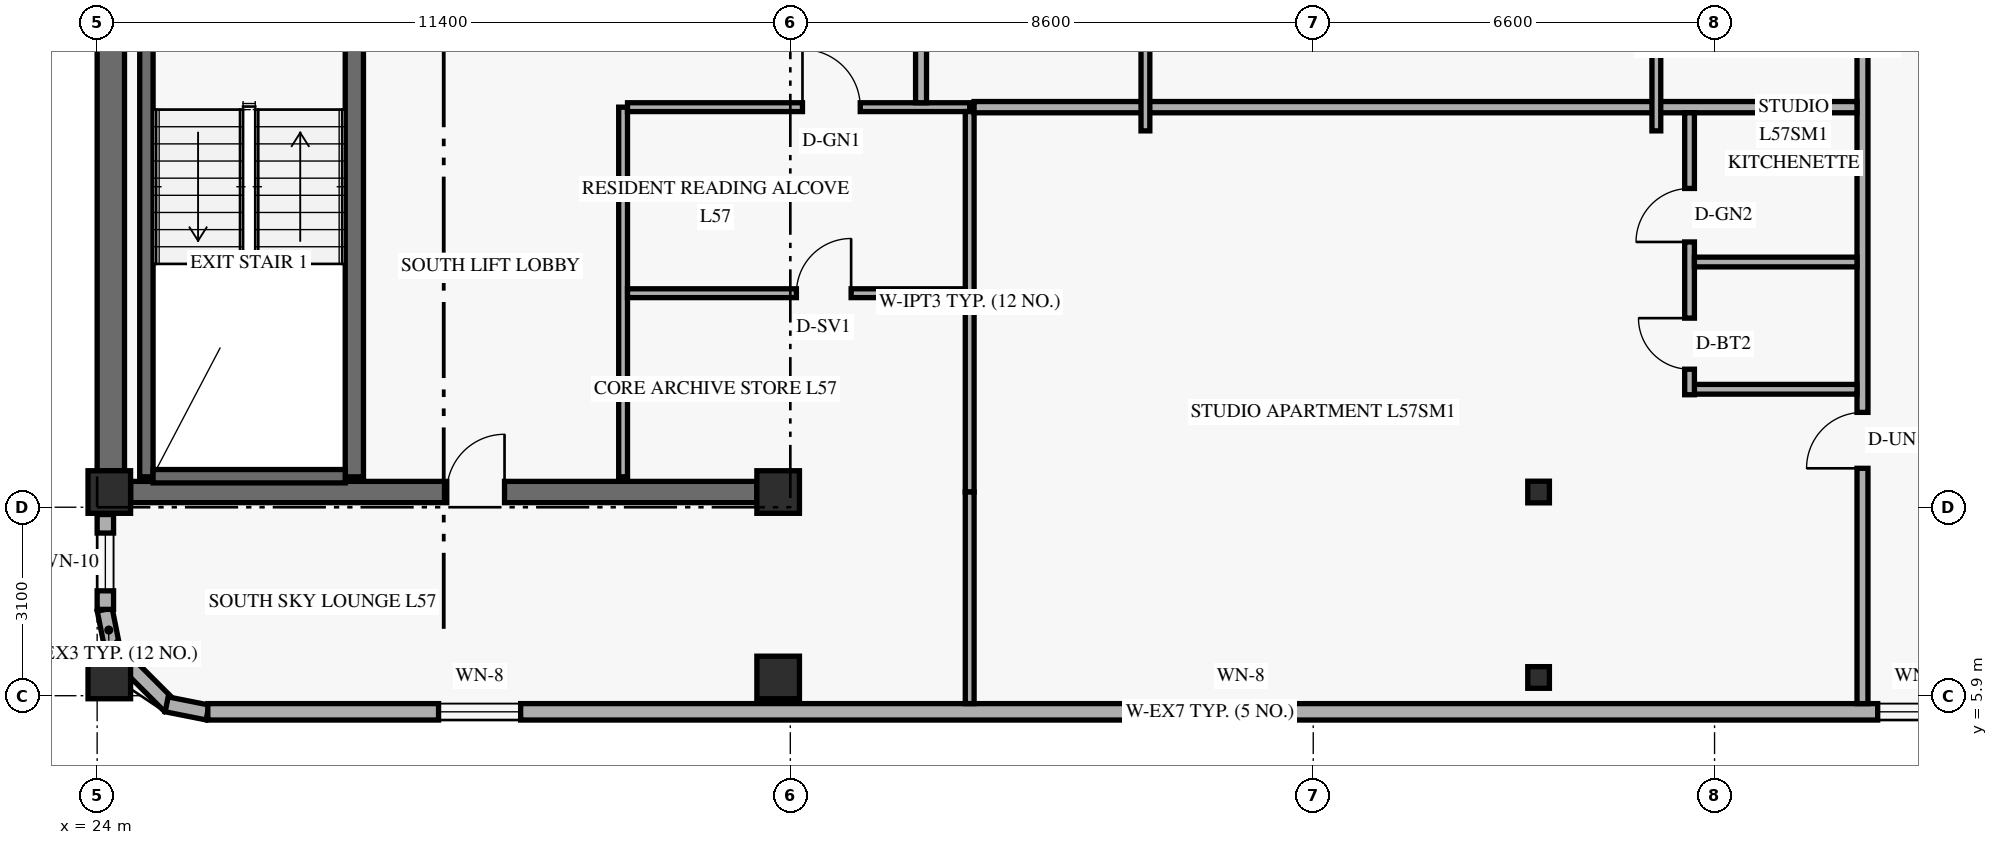
"""IFC4 building model, lengths in metres.
Left out: names, types, materials, properties, quantities, classifications, styles, units other than length and angle.
Written with IfcOpenShell. Run it as: python <this file> out.ifc"""

import sys

from ifc_helpers import new_model, si_unit, direction, frame, frame_2d, origin, origin_2d, place, context, subcontext, project, spatial, rectangle, hollow_rectangle, extrude, element, fill, save


model = new_model("IFC4")
c1 = context("Model", 3, precision=1e-05, world=origin(), true_north=direction((0.0, 1.0)))
c2 = subcontext(c1, "Body", "Model", "MODEL_VIEW")
j1 = project(units=[si_unit("LENGTHUNIT", "METRE"), si_unit("PLANEANGLEUNIT", "RADIAN")], contexts=[c1])
p1 = place(None, origin())
s1 = spatial("IfcSite", under=j1, at=p1, CompositionType="ELEMENT")
p2 = place(p1, origin())
s2 = spatial("IfcBuilding", under=s1, at=p2, CompositionType="ELEMENT")
p3 = place(p2, frame((0.0, 0.0, 220.2)))
s3 = spatial("IfcBuildingStorey", under=s2, at=p3, CompositionType="ELEMENT", Elevation=220.2)
p4 = place(p3, frame((24.225, 9.6, 0.0), z_axis=(0.0, 0.0, 1.0), x_axis=(0.0, 1.0, 0.0)))
e1 = element("IfcWall", 1, at=p4, inside=s3, PredefinedType="SHEAR", context=c2, shape_type="SweptSolid", body=[
    extrude(rectangle(XDim=7.6, YDim=0.45, at=frame_2d((3.8, 0.0))), origin(), (0.0, 0.0, 1.0), 2.821),
])
p5 = place(p3, frame((24.55, 9.25, 0.0), z_axis=(0.0, 0.0, 1.0), x_axis=(1.0, 0.0, 0.0)))
e2 = element("IfcWall", 2, at=p5, inside=s3, PredefinedType="SHEAR", context=c2, shape_type="SweptSolid", body=[
    extrude(rectangle(XDim=10.3, YDim=0.35, at=frame_2d((5.15, 0.0))), origin(), (0.0, 0.0, 1.0), 3.36),
])
p6 = place(p5, frame((5.2, 0.0, 0.0)))
e3 = element("IfcOpeningElement", 3, at=p6, cuts=e2, PredefinedType="OPENING", context=c2, shape_type="SweptSolid", body=[
    extrude(rectangle(XDim=0.95, YDim=2.15, at=frame_2d((0.475, 1.075))), frame((0.0, 0.185, 0.0), z_axis=(0.0, -1.0, 0.0), x_axis=(1.0, 0.0, 0.0)), (0.0, 0.0, 1.0), 0.37),
])
p7 = place(p3, frame((24.81, 9.5, 0.0), z_axis=(0.0, 0.0, 1.0), x_axis=(0.0, 1.0, 0.0)))
e4 = element("IfcWall", 4, at=p7, inside=s3, PredefinedType="SHEAR", context=c2, shape_type="SweptSolid", body=[
    extrude(rectangle(XDim=7.76, YDim=0.22, at=frame_2d((3.88, 0.0))), origin(), (0.0, 0.0, 1.0), 3.36),
])
p8 = place(p3, frame((28.23, 9.5, 0.0), z_axis=(0.0, 0.0, 1.0), x_axis=(0.0, 1.0, 0.0)))
e5 = element("IfcWall", 5, at=p8, inside=s3, PredefinedType="SHEAR", context=c2, shape_type="SweptSolid", body=[
    extrude(rectangle(XDim=7.76, YDim=0.3, at=frame_2d((3.88, 0.0))), origin(), (0.0, 0.0, 1.0), 3.36),
])
p9 = place(p3, frame((24.92, 9.51, 0.0), z_axis=(0.0, 0.0, 1.0), x_axis=(1.0, 0.0, 0.0)))
e6 = element("IfcWall", 6, at=p9, inside=s3, PredefinedType="SHEAR", context=c2, shape_type="SweptSolid", body=[
    extrude(rectangle(XDim=3.16, YDim=0.22, at=frame_2d((1.58, 0.0))), origin(), (0.0, 0.0, 1.0), 3.36),
])
for number, where, z_axis, x_axis in (
    (7, (24.2, 6.2, 0.0), (0.0, 0.0, 1.0), (1.0, 0.0, 0.0)),
    (8, (24.2, 9.25, 0.0), (0.0, 0.0, 1.0), (1.0, 0.0, 0.0)),
    (9, (35.2, 6.2, 0.0), (0.0, 0.0, 1.0), (1.0, 0.0, 0.0)),
    (10, (35.2, 9.25, 0.0), (0.0, 0.0, 1.0), (1.0, 0.0, 0.0)),
):
    element("IfcColumn", number, at=place(p3, frame(where, z_axis=z_axis, x_axis=x_axis)), inside=s3, PredefinedType="COLUMN", context=c2, shape_type="SweptSolid", body=[
        extrude(rectangle(XDim=0.7, YDim=0.7, at=origin_2d()), origin(), (0.0, 0.0, 1.0), 3.6),
    ])
for number, where, z_axis, x_axis in (
    (11, (47.643, 6.2, 0.0), (0.035, 0.0, 0.999), (0.0, 1.0, 0.0)),
    (12, (47.643, 9.25, 0.0), (0.035, 0.0, 0.999), (0.0, 1.0, 0.0)),
):
    element("IfcColumn", number, at=place(p3, frame(where, z_axis=z_axis, x_axis=x_axis)), inside=s3, PredefinedType="COLUMN", context=c2, shape_type="SweptSolid", body=[
        extrude(hollow_rectangle(XDim=0.356, YDim=0.356, WallThickness=0.016, at=origin_2d()), origin(), (0.0, 0.0, 1.0), 3.602),
    ])
p10 = place(p3, frame((24.124, 7.316, 0.0), z_axis=(0.0, 0.0, 1.0), x_axis=(0.194952956674, -0.980812594069, 0.0)))
e13 = element("IfcWall", 13, at=p10, inside=s3, PredefinedType="SOLIDWALL", context=c2, shape_type="SweptSolid", body=[
    extrude(rectangle(XDim=0.686, YDim=0.25, at=frame_2d((0.343, 0.0))), origin(), (0.0, 0.0, 1.0), 2.803),
])
p11 = place(p3, frame((24.231, 6.694, 0.0), z_axis=(0.0, 0.0, 1.0), x_axis=(0.707106781187, -0.707106781187, 0.0)))
e14 = element("IfcWall", 14, at=p11, inside=s3, PredefinedType="SOLIDWALL", context=c2, shape_type="SweptSolid", body=[
    extrude(rectangle(XDim=1.362, YDim=0.25, at=frame_2d((0.681, 0.0))), origin(), (0.0, 0.0, 1.0), 2.803),
])
p12 = place(p3, frame((25.143, 5.758, 0.0), z_axis=(0.0, 0.0, 1.0), x_axis=(0.980812594069, -0.194952956674, 0.0)))
e15 = element("IfcWall", 15, at=p12, inside=s3, PredefinedType="SOLIDWALL", context=c2, shape_type="SweptSolid", body=[
    extrude(rectangle(XDim=0.686, YDim=0.25, at=frame_2d((0.343, 0.0))), origin(), (0.0, 0.0, 1.0), 3.36),
])
p13 = place(p3, frame((25.82, 5.635, 0.0), z_axis=(0.0, 0.0, 1.0), x_axis=(1.0, 0.0, 0.0)))
e16 = element("IfcWall", 16, at=p13, inside=s3, PredefinedType="SOLIDWALL", context=c2, shape_type="SweptSolid", body=[
    extrude(rectangle(XDim=32.96, YDim=0.27, at=frame_2d((16.48, 0.0))), origin(), (0.0, 0.0, 1.0), 3.36),
])
p14 = place(p13, frame((3.795, 0.0, 0.85)))
e17 = element("IfcOpeningElement", 17, at=p14, cuts=e16, PredefinedType="OPENING", context=c2, shape_type="SweptSolid", body=[
    extrude(rectangle(XDim=1.35, YDim=1.55, at=frame_2d((0.675, 0.775))), frame((0.0, 0.145, 0.0), z_axis=(0.0, -1.0, 0.0), x_axis=(1.0, 0.0, 0.0)), (0.0, 0.0, 1.0), 0.29),
])
p15 = place(p13, frame((16.313, 0.0, 0.85)))
e18 = element("IfcOpeningElement", 18, at=p15, cuts=e16, PredefinedType="OPENING", context=c2, shape_type="SweptSolid", body=[
    extrude(rectangle(XDim=1.35, YDim=1.55, at=frame_2d((0.675, 0.775))), frame((0.0, 0.145, 0.0), z_axis=(0.0, -1.0, 0.0), x_axis=(1.0, 0.0, 0.0)), (0.0, 0.0, 1.0), 0.29),
])
p16 = place(p13, frame((27.463, 0.0, 0.85)))
e19 = element("IfcOpeningElement", 19, at=p16, cuts=e16, PredefinedType="OPENING", context=c2, shape_type="SweptSolid", body=[
    extrude(rectangle(XDim=1.35, YDim=1.55, at=frame_2d((0.675, 0.775))), frame((0.0, 0.145, 0.0), z_axis=(0.0, -1.0, 0.0), x_axis=(1.0, 0.0, 0.0)), (0.0, 0.0, 1.0), 0.29),
])
p17 = place(p13, frame((30.881, 0.0, 0.85)))
e20 = element("IfcOpeningElement", 20, at=p17, cuts=e16, PredefinedType="OPENING", context=c2, shape_type="SweptSolid", body=[
    extrude(rectangle(XDim=1.35, YDim=1.55, at=frame_2d((0.675, 0.775))), frame((0.0, 0.145, 0.0), z_axis=(0.0, -1.0, 0.0), x_axis=(1.0, 0.0, 0.0)), (0.0, 0.0, 1.0), 0.29),
])
p18 = place(p3, frame((24.135, 7.32, 0.0), z_axis=(0.0, 0.0, 1.0), x_axis=(0.0, 1.0, 0.0)))
e21 = element("IfcWall", 21, at=p18, inside=s3, PredefinedType="SOLIDWALL", context=c2, shape_type="SweptSolid", body=[
    extrude(rectangle(XDim=1.56, YDim=0.27, at=frame_2d((0.78, 0.0))), origin(), (0.0, 0.0, 1.0), 2.803),
])
p19 = place(p18, frame((0.305, 0.0, 0.85)))
e22 = element("IfcOpeningElement", 22, at=p19, cuts=e21, PredefinedType="OPENING", context=c2, shape_type="SweptSolid", body=[
    extrude(rectangle(XDim=0.95, YDim=1.5, at=frame_2d((0.475, 0.75))), frame((0.0, 0.145, 0.0), z_axis=(0.0, -1.0, 0.0), x_axis=(1.0, 0.0, 0.0)), (0.0, 0.0, 1.0), 0.29),
])
p20 = place(p3, frame((32.65, 9.5, 0.0), z_axis=(0.0, 0.0, 1.0), x_axis=(0.0, 1.0, 0.0)))
e23 = element("IfcWall", 23, at=p20, inside=s3, PredefinedType="PARTITIONING", context=c2, shape_type="SweptSolid", body=[
    extrude(rectangle(XDim=6.08, YDim=0.145, at=frame_2d((3.04, 0.0))), origin(), (0.0, 0.0, 1.0), 3.36),
])
p21 = place(p3, frame((32.722, 15.58, 0.0), z_axis=(0.0, 0.0, 1.0), x_axis=(1.0, 0.0, 0.0)))
e24 = element("IfcWall", 24, at=p21, inside=s3, PredefinedType="PARTITIONING", context=c2, shape_type="SweptSolid", body=[
    extrude(rectangle(XDim=5.628, YDim=0.145, at=frame_2d((2.814, 0.0))), origin(), (0.0, 0.0, 1.0), 2.803),
])
p22 = place(p21, frame((2.877, 0.0, 0.0)))
e25 = element("IfcOpeningElement", 25, at=p22, cuts=e24, PredefinedType="OPENING", context=c2, shape_type="SweptSolid", body=[
    extrude(rectangle(XDim=0.95, YDim=2.15, at=frame_2d((0.475, 1.075))), frame((0.0, 0.083, 0.0), z_axis=(0.0, -1.0, 0.0), x_axis=(1.0, 0.0, 0.0)), (0.0, 0.0, 1.0), 0.165),
])
p23 = place(p3, frame((38.35, 9.25, 0.0), z_axis=(0.0, 0.0, 1.0), x_axis=(0.0, 1.0, 0.0)))
e26 = element("IfcWall", 26, at=p23, inside=s3, PredefinedType="PARTITIONING", context=c2, shape_type="SweptSolid", body=[
    extrude(rectangle(XDim=6.258, YDim=0.145, at=frame_2d((3.129, 0.0))), origin(), (0.0, 0.0, 1.0), 2.803),
])
p24 = place(p3, frame((32.722, 12.52, 0.0), z_axis=(0.0, 0.0, 1.0), x_axis=(1.0, 0.0, 0.0)))
e27 = element("IfcWall", 27, at=p24, inside=s3, PredefinedType="PARTITIONING", context=c2, shape_type="SweptSolid", body=[
    extrude(rectangle(XDim=5.555, YDim=0.145, at=frame_2d((2.778, 0.0))), origin(), (0.0, 0.0, 1.0), 2.803),
])
p25 = place(p24, frame((2.778, 0.0, 0.0)))
e28 = element("IfcOpeningElement", 28, at=p25, cuts=e27, PredefinedType="OPENING", context=c2, shape_type="SweptSolid", body=[
    extrude(rectangle(XDim=0.9, YDim=2.1, at=frame_2d((0.45, 1.05))), frame((0.0, 0.083, 0.0), z_axis=(0.0, -1.0, 0.0), x_axis=(1.0, 0.0, 0.0)), (0.0, 0.0, 1.0), 0.165),
])
p26 = place(p3, frame((37.55, 15.653, 0.0), z_axis=(0.0, 0.0, 1.0), x_axis=(0.0, 1.0, 0.0)))
e29 = element("IfcWall", 29, at=p26, inside=s3, PredefinedType="STANDARD", context=c2, shape_type="SweptSolid", body=[
    extrude(rectangle(XDim=11.147, YDim=0.18, at=frame_2d((5.574, 0.0))), origin(), (0.0, 0.0, 1.0), 2.803),
])
p27 = place(p3, frame((53.033, 5.77, 0.0), z_axis=(0.0, 0.0, 1.0), x_axis=(0.0, 1.0, 0.0)))
e30 = element("IfcWall", 30, at=p27, inside=s3, PredefinedType="STANDARD", context=c2, shape_type="SweptSolid", body=[
    extrude(rectangle(XDim=21.03, YDim=0.18, at=frame_2d((10.515, 0.0))), origin(), (0.0, 0.0, 1.0), 2.803),
])
p28 = place(p27, frame((3.87, 0.0, 0.0)))
e31 = element("IfcOpeningElement", 31, at=p28, cuts=e30, PredefinedType="OPENING", context=c2, shape_type="SweptSolid", body=[
    extrude(rectangle(XDim=0.92, YDim=2.15, at=frame_2d((0.46, 1.075))), frame((0.0, 0.1, 0.0), z_axis=(0.0, -1.0, 0.0), x_axis=(1.0, 0.0, 0.0)), (0.0, 0.0, 1.0), 0.2),
])
p29 = place(p3, frame((38.35, 5.77, 0.0), z_axis=(0.0, 0.0, 1.0), x_axis=(0.0, 1.0, 0.0)))
e32 = element("IfcWall", 32, at=p29, inside=s3, PredefinedType="PARTITIONING", context=c2, shape_type="SweptSolid", body=[
    extrude(rectangle(XDim=3.48, YDim=0.145, at=frame_2d((1.74, 0.0))), origin(), (0.0, 0.0, 1.0), 2.803),
])
p30 = place(p3, frame((38.423, 15.58, 0.0), z_axis=(0.0, 0.0, 1.0), x_axis=(1.0, 0.0, 0.0)))
e33 = element("IfcWall", 33, at=p30, inside=s3, PredefinedType="PARTITIONING", context=c2, shape_type="SweptSolid", body=[
    extrude(rectangle(XDim=14.52, YDim=0.185, at=frame_2d((7.26, 0.0))), origin(), (0.0, 0.0, 1.0), 2.803),
])
p31 = place(p3, frame((50.109, 10.94, 0.0), z_axis=(0.0, 0.0, 1.0), x_axis=(1.0, 0.0, 0.0)))
e34 = element("IfcWall", 34, at=p31, inside=s3, PredefinedType="PLUMBINGWALL", context=c2, shape_type="SweptSolid", body=[
    extrude(rectangle(XDim=2.834, YDim=0.16, at=frame_2d((1.417, 0.0))), origin(), (0.0, 0.0, 1.0), 3.36),
])
p32 = place(p3, frame((50.189, 10.85, 0.0), z_axis=(0.0, 0.0, 1.0), x_axis=(0.0, 1.0, 0.0)))
e35 = element("IfcWall", 35, at=p32, inside=s3, PredefinedType="PLUMBINGWALL", context=c2, shape_type="SweptSolid", body=[
    extrude(rectangle(XDim=4.637, YDim=0.16, at=frame_2d((2.319, 0.0))), origin(), (0.0, 0.0, 1.0), 3.039),
])
p33 = place(p32, frame((0.42, 0.0, 0.0)))
e36 = element("IfcOpeningElement", 36, at=p33, cuts=e35, PredefinedType="OPENING", context=c2, shape_type="SweptSolid", body=[
    extrude(rectangle(XDim=0.84, YDim=2.12, at=frame_2d((0.42, 1.06))), frame((0.0, 0.09, 0.0), z_axis=(0.0, -1.0, 0.0), x_axis=(1.0, 0.0, 0.0)), (0.0, 0.0, 1.0), 0.18),
])
p34 = place(p32, frame((2.513, 0.0, 0.0)))
e37 = element("IfcOpeningElement", 37, at=p34, cuts=e35, PredefinedType="OPENING", context=c2, shape_type="SweptSolid", body=[
    extrude(rectangle(XDim=0.88, YDim=2.12, at=frame_2d((0.44, 1.06))), frame((0.0, 0.09, 0.0), z_axis=(0.0, -1.0, 0.0), x_axis=(1.0, 0.0, 0.0)), (0.0, 0.0, 1.0), 0.18),
])
p35 = place(p3, frame((50.269, 13.033, 0.0), z_axis=(0.0, 0.0, 1.0), x_axis=(1.0, 0.0, 0.0)))
e38 = element("IfcWall", 38, at=p35, inside=s3, PredefinedType="PLUMBINGWALL", context=c2, shape_type="SweptSolid", body=[
    extrude(rectangle(XDim=2.674, YDim=0.16, at=frame_2d((1.337, 0.0))), origin(), (0.0, 0.0, 1.0), 3.36),
])
p36 = place(p3, frame((49.643, 15.19, 0.0), z_axis=(0.0, 0.0, 1.0), x_axis=(0.0, 1.0, 0.0)))
e39 = element("IfcWall", 39, at=p36, inside=s3, PredefinedType="PARTITIONING", context=c2, shape_type="SweptSolid", body=[
    extrude(rectangle(XDim=11.52, YDim=0.145, at=frame_2d((5.76, 0.0))), origin(), (0.0, 0.0, 1.0), 2.803),
])
p37 = place(p36, frame((2.755, 0.0, 0.0)))
e40 = element("IfcOpeningElement", 40, at=p37, cuts=e39, PredefinedType="OPENING", context=c2, shape_type="SweptSolid", body=[
    extrude(rectangle(XDim=0.88, YDim=2.14, at=frame_2d((0.44, 1.07))), frame((0.0, 0.083, 0.0), z_axis=(0.0, -1.0, 0.0), x_axis=(1.0, 0.0, 0.0)), (0.0, 0.0, 1.0), 0.165),
])
p38 = place(p36, frame((6.955, 0.0, 0.0)))
e41 = element("IfcOpeningElement", 41, at=p38, cuts=e39, PredefinedType="OPENING", context=c2, shape_type="SweptSolid", body=[
    extrude(rectangle(XDim=0.88, YDim=2.12, at=frame_2d((0.44, 1.06))), frame((0.0, 0.083, 0.0), z_axis=(0.0, -1.0, 0.0), x_axis=(1.0, 0.0, 0.0)), (0.0, 0.0, 1.0), 0.165),
])
p39 = place(p3, frame((41.24, 15.19, 0.0), z_axis=(0.0, 0.0, 1.0), x_axis=(0.0, 1.0, 0.0)))
e42 = element("IfcWall", 42, at=p39, inside=s3, PredefinedType="PARTITIONING", context=c2, shape_type="SweptSolid", body=[
    extrude(rectangle(XDim=11.52, YDim=0.145, at=frame_2d((5.76, 0.0))), origin(), (0.0, 0.0, 1.0), 2.803),
])
p40 = place(p39, frame((5.07, 0.0, 0.0)))
e43 = element("IfcOpeningElement", 43, at=p40, cuts=e42, PredefinedType="OPENING", context=c2, shape_type="SweptSolid", body=[
    extrude(rectangle(XDim=0.95, YDim=2.15, at=frame_2d((0.475, 1.075))), frame((0.0, 0.083, 0.0), z_axis=(0.0, -1.0, 0.0), x_axis=(1.0, 0.0, 0.0)), (0.0, 0.0, 1.0), 0.165),
])
p41 = place(p14, origin())
e44 = element("IfcWindow", 44, at=p41, inside=s3, PartitioningType="SINGLE_PANEL", PredefinedType="WINDOW", context=c2, shape_type="SweptSolid", body=[
    extrude(rectangle(XDim=1.35, YDim=1.55, at=frame_2d((0.675, 0.775))), frame((0.0, 0.03, 0.0), z_axis=(0.0, -1.0, 0.0), x_axis=(1.0, 0.0, 0.0)), (0.0, 0.0, 1.0), 0.06),
])
fill(e17, e44)
p42 = place(p15, origin())
e45 = element("IfcWindow", 45, at=p42, inside=s3, PartitioningType="SINGLE_PANEL", PredefinedType="WINDOW", context=c2, shape_type="SweptSolid", body=[
    extrude(rectangle(XDim=1.35, YDim=1.55, at=frame_2d((0.675, 0.775))), frame((0.0, 0.03, 0.0), z_axis=(0.0, -1.0, 0.0), x_axis=(1.0, 0.0, 0.0)), (0.0, 0.0, 1.0), 0.06),
])
fill(e18, e45)
p43 = place(p16, origin())
e46 = element("IfcWindow", 46, at=p43, inside=s3, PartitioningType="SINGLE_PANEL", PredefinedType="WINDOW", context=c2, shape_type="SweptSolid", body=[
    extrude(rectangle(XDim=1.35, YDim=1.55, at=frame_2d((0.675, 0.775))), frame((0.0, 0.03, 0.0), z_axis=(0.0, -1.0, 0.0), x_axis=(1.0, 0.0, 0.0)), (0.0, 0.0, 1.0), 0.06),
])
fill(e19, e46)
p44 = place(p19, origin())
e47 = element("IfcWindow", 47, at=p44, inside=s3, PartitioningType="SINGLE_PANEL", PredefinedType="WINDOW", context=c2, shape_type="SweptSolid", body=[
    extrude(rectangle(XDim=0.95, YDim=1.5, at=frame_2d((0.475, 0.75))), frame((0.0, 0.03, 0.0), z_axis=(0.0, -1.0, 0.0), x_axis=(1.0, 0.0, 0.0)), (0.0, 0.0, 1.0), 0.06),
])
fill(e22, e47)
p45 = place(p22, origin())
e48 = element("IfcDoor", 48, at=p45, inside=s3, OperationType="SINGLE_SWING_LEFT", PredefinedType="DOOR", context=c2, shape_type="SweptSolid", body=[
    extrude(rectangle(XDim=0.95, YDim=2.15, at=frame_2d((0.475, 1.075))), frame((0.0, 0.025, 0.0), z_axis=(0.0, -1.0, 0.0), x_axis=(1.0, 0.0, 0.0)), (0.0, 0.0, 1.0), 0.05),
])
fill(e25, e48)
p46 = place(p25, origin())
e49 = element("IfcDoor", 49, at=p46, inside=s3, OperationType="SINGLE_SWING_RIGHT", PredefinedType="DOOR", context=c2, shape_type="SweptSolid", body=[
    extrude(rectangle(XDim=0.9, YDim=2.1, at=frame_2d((0.45, 1.05))), frame((0.0, 0.025, 0.0), z_axis=(0.0, -1.0, 0.0), x_axis=(1.0, 0.0, 0.0)), (0.0, 0.0, 1.0), 0.05),
])
fill(e28, e49)
p47 = place(p6, frame((0.95, 0.0, 0.0), z_axis=(0.0, 0.0, 1.0), x_axis=(-1.0, 0.0, 0.0)))
e50 = element("IfcDoor", 50, at=p47, inside=s3, OperationType="SINGLE_SWING_LEFT", PredefinedType="DOOR", context=c2, shape_type="SweptSolid", body=[
    extrude(rectangle(XDim=0.95, YDim=2.15, at=frame_2d((0.475, 1.075))), frame((0.0, 0.025, 0.0), z_axis=(0.0, -1.0, 0.0), x_axis=(1.0, 0.0, 0.0)), (0.0, 0.0, 1.0), 0.05),
])
fill(e3, e50)
p48 = place(p28, origin())
e51 = element("IfcDoor", 51, at=p48, inside=s3, OperationType="SINGLE_SWING_LEFT", PredefinedType="DOOR", context=c2, shape_type="SweptSolid", body=[
    extrude(rectangle(XDim=0.92, YDim=2.15, at=frame_2d((0.46, 1.075))), frame((0.0, 0.025, 0.0), z_axis=(0.0, -1.0, 0.0), x_axis=(1.0, 0.0, 0.0)), (0.0, 0.0, 1.0), 0.05),
])
fill(e31, e51)
p49 = place(p33, origin())
e52 = element("IfcDoor", 52, at=p49, inside=s3, OperationType="SINGLE_SWING_RIGHT", PredefinedType="DOOR", context=c2, shape_type="SweptSolid", body=[
    extrude(rectangle(XDim=0.84, YDim=2.12, at=frame_2d((0.42, 1.06))), frame((0.0, 0.025, 0.0), z_axis=(0.0, -1.0, 0.0), x_axis=(1.0, 0.0, 0.0)), (0.0, 0.0, 1.0), 0.05),
])
fill(e36, e52)
p50 = place(p34, origin())
e53 = element("IfcDoor", 53, at=p50, inside=s3, OperationType="SINGLE_SWING_LEFT", PredefinedType="DOOR", context=c2, shape_type="SweptSolid", body=[
    extrude(rectangle(XDim=0.88, YDim=2.12, at=frame_2d((0.44, 1.06))), frame((0.0, 0.025, 0.0), z_axis=(0.0, -1.0, 0.0), x_axis=(1.0, 0.0, 0.0)), (0.0, 0.0, 1.0), 0.05),
])
fill(e37, e53)
save(model, sys.argv[1])
